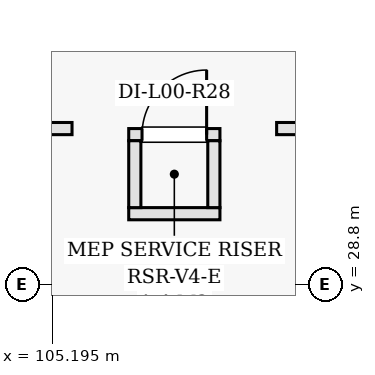
"""IFC4 building model, lengths in metres.
Left out: names, types, materials, properties, quantities, classifications, styles, units other than length and angle.
Written with IfcOpenShell. Run it as: python <this file> out.ifc"""

import sys

from ifc_helpers import new_model, si_unit, direction, frame, frame_2d, origin, place, context, subcontext, project, spatial, rectangle, extrude, element, fill, save


model = new_model("IFC4")
c1 = context("Model", 3, precision=1e-05, world=origin(), true_north=direction((0.0, 1.0)))
c2 = subcontext(c1, "Body", "Model", "MODEL_VIEW")
j1 = project(units=[si_unit("LENGTHUNIT", "METRE"), si_unit("PLANEANGLEUNIT", "RADIAN")], contexts=[c1])
p1 = place(None, origin())
s1 = spatial("IfcSite", under=j1, at=p1, CompositionType="ELEMENT")
p2 = place(p1, origin())
s2 = spatial("IfcBuilding", under=s1, at=p2, CompositionType="ELEMENT")
p3 = place(p2, origin())
s3 = spatial("IfcBuildingStorey", under=s2, at=p3, CompositionType="ELEMENT", Elevation=0.0)
p4 = place(p3, frame((106.2, 29.73, 0.0), z_axis=(0.0, 0.0, 1.0), x_axis=(1.0, 0.0, 0.0)))
e1 = element("IfcWall", 1, at=p4, inside=s3, PredefinedType="PARTITIONING", context=c2, shape_type="SweptSolid", body=[
    extrude(rectangle(XDim=1.2, YDim=0.16, at=frame_2d((0.6, 0.0))), origin(), (0.0, 0.0, 1.0), 4.52),
])
p5 = place(p3, frame((106.2, 30.77, 0.0), z_axis=(0.0, 0.0, 1.0), x_axis=(1.0, 0.0, 0.0)))
e2 = element("IfcWall", 2, at=p5, inside=s3, PredefinedType="PARTITIONING", context=c2, shape_type="SweptSolid", body=[
    extrude(rectangle(XDim=1.2, YDim=0.16, at=frame_2d((0.6, 0.0))), origin(), (0.0, 0.0, 1.0), 4.52),
])
p6 = place(p5, frame((0.175, 0.0, 0.0)))
e3 = element("IfcOpeningElement", 3, at=p6, cuts=e2, PredefinedType="OPENING", context=c2, shape_type="SweptSolid", body=[
    extrude(rectangle(XDim=0.85, YDim=2.02, at=frame_2d((0.425, 1.01))), frame((0.0, 0.09, 0.0), z_axis=(0.0, -1.0, 0.0), x_axis=(1.0, 0.0, 0.0)), (0.0, 0.0, 1.0), 0.18),
])
for number, where, z_axis, x_axis in (
    (4, (106.28, 29.81, 0.0), (0.0, 0.0, 1.0), (0.0, 1.0, 0.0)),
    (5, (107.32, 29.81, 0.0), (0.0, 0.0, 1.0), (0.0, 1.0, 0.0)),
):
    element("IfcWall", number, at=place(p3, frame(where, z_axis=z_axis, x_axis=x_axis)), inside=s3, PredefinedType="PARTITIONING", context=c2, shape_type="SweptSolid", body=[
        extrude(rectangle(XDim=0.88, YDim=0.16, at=frame_2d((0.44, 0.0))), origin(), (0.0, 0.0, 1.0), 4.52),
    ])
p7 = place(p3, frame((108.146, 30.85, 0.0), z_axis=(0.0, 0.0, 1.0), x_axis=(1.0, 0.0, 0.0)))
e6 = element("IfcWall", 6, at=p7, inside=s3, PredefinedType="PARTITIONING", context=c2, shape_type="SweptSolid", body=[
    extrude(rectangle(XDim=3.149, YDim=0.16, at=frame_2d((1.574, 0.0))), origin(), (0.0, 0.0, 1.0), 3.955),
])
p8 = place(p7, frame((1.025, 0.0, 0.0)))
e7 = element("IfcOpeningElement", 7, at=p8, cuts=e6, PredefinedType="OPENING", context=c2, shape_type="SweptSolid", body=[
    extrude(rectangle(XDim=1.1, YDim=2.15, at=frame_2d((0.55, 1.075))), frame((0.0, 0.09, 0.0), z_axis=(0.0, -1.0, 0.0), x_axis=(1.0, 0.0, 0.0)), (0.0, 0.0, 1.0), 0.18),
])
p9 = place(p3, frame((102.487, 30.85, 0.0), z_axis=(0.0, 0.0, 1.0), x_axis=(1.0, 0.0, 0.0)))
e8 = element("IfcWall", 8, at=p9, inside=s3, PredefinedType="PARTITIONING", context=c2, shape_type="SweptSolid", body=[
    extrude(rectangle(XDim=2.967, YDim=0.16, at=frame_2d((1.483, 0.0))), origin(), (0.0, 0.0, 1.0), 3.605),
])
p10 = place(p6, origin())
e9 = element("IfcDoor", 9, at=p10, inside=s3, OperationType="SINGLE_SWING_RIGHT", PredefinedType="DOOR", context=c2, shape_type="SweptSolid", body=[
    extrude(rectangle(XDim=0.85, YDim=2.02, at=frame_2d((0.425, 1.01))), frame((0.0, 0.025, 0.0), z_axis=(0.0, -1.0, 0.0), x_axis=(1.0, 0.0, 0.0)), (0.0, 0.0, 1.0), 0.05),
])
fill(e3, e9)
save(model, sys.argv[1])
